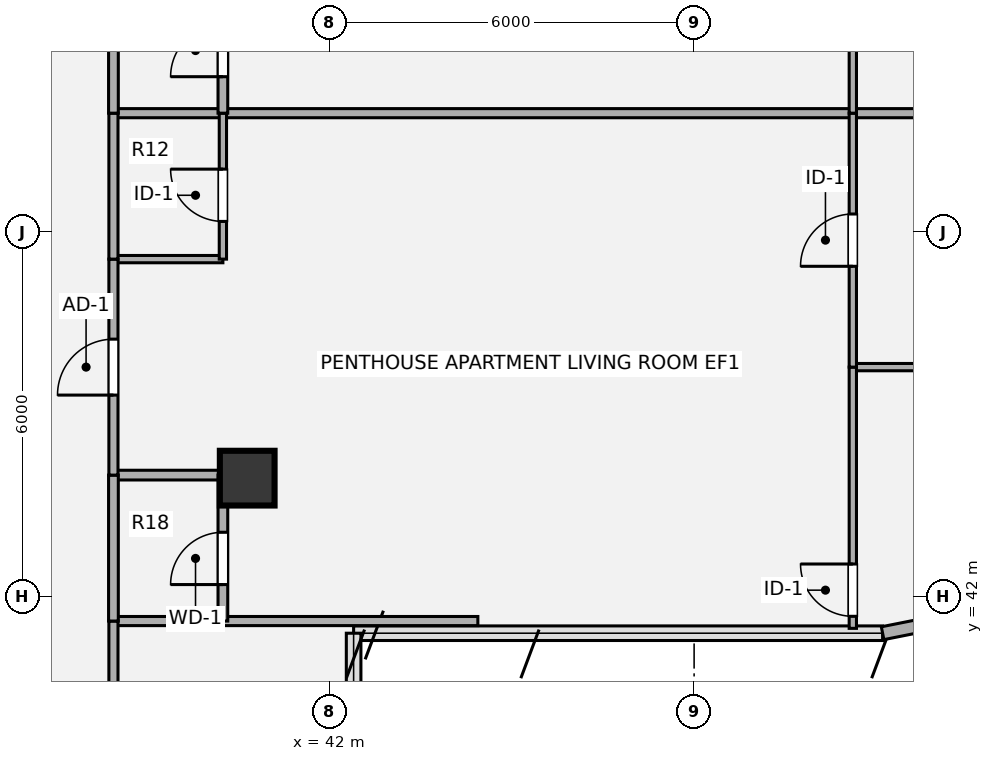
"""IFC4 building model, lengths in metres.
Left out: names, types, materials, properties, quantities, classifications, styles, units other than length and angle.
Written with IfcOpenShell. Run it as: python <this file> out.ifc"""

import sys

from ifc_helpers import new_model, si_unit, direction, frame, frame_2d, origin, origin_2d, place, context, subcontext, project, spatial, rectangle, hollow_circle, extrude, source, transform, mapped, element, fill, save


model = new_model("IFC4")
c1 = context("Model", 3, precision=1e-05, world=origin(), true_north=direction((0.0, 1.0)))
c2 = subcontext(c1, "Body", "Model", "MODEL_VIEW")
j1 = project(units=[si_unit("LENGTHUNIT", "METRE"), si_unit("PLANEANGLEUNIT", "RADIAN")], contexts=[c1])
p1 = place(None, origin())
s1 = spatial("IfcSite", under=j1, at=p1, CompositionType="ELEMENT")
p2 = place(p1, origin())
s2 = spatial("IfcBuilding", under=s1, at=p2, CompositionType="ELEMENT")
p3 = place(p2, frame((0.0, 0.0, 223.02)))
s3 = spatial("IfcBuildingStorey", under=s2, at=p3, CompositionType="ELEMENT", Elevation=223.02)
m1 = source(origin(), c2, "Body", "SweptSolid", [
    extrude(hollow_circle(Radius=0.45, WallThickness=0.032, at=origin_2d()), origin(), (0.0, 0.0, 1.0), 3.78),
])
p4 = place(p3, frame((40.65, 43.95, 0.0), z_axis=(0.0, 0.0, 1.0), x_axis=(1.0, 0.0, 0.0)))
e1 = element("IfcColumn", 1, at=p4, inside=s3, PredefinedType="COLUMN", context=c2, shape_type="MappedRepresentation", body=[
    mapped(m1, transform((0.0, 0.0, 0.0), x_axis=(1.0, 0.0, 0.0), y_axis=(0.0, 1.0, 0.0), z_axis=(0.0, 0.0, 1.0), scale=1.0)),
])
p5 = place(p3, frame((52.325, 41.644, 0.0), z_axis=(0.0, 0.0, 1.0), x_axis=(-0.980775717779, -0.195138390419, 0.0)))
e2 = element("IfcWall", 2, at=p5, inside=s3, PredefinedType="SOLIDWALL", context=c2, shape_type="SweptSolid", body=[
    extrude(rectangle(XDim=1.249, YDim=0.215, at=frame_2d((0.624, 0.0))), origin(), (0.0, 0.0, 1.0), 3.53),
])
p6 = place(p3, frame((38.45, 41.6, 0.0), z_axis=(0.0, 0.0, 1.0), x_axis=(1.0, 0.0, 0.0)))
e3 = element("IfcWall", 3, at=p6, inside=s3, PredefinedType="PARTITIONING", context=c2, shape_type="SweptSolid", body=[
    extrude(rectangle(XDim=5.993, YDim=0.15, at=frame_2d((2.997, 0.0))), origin(), (0.0, 0.0, 1.0), 3.5),
])
p7 = place(p3, frame((38.45, 44.0, 0.0), z_axis=(0.0, 0.0, 1.0), x_axis=(1.0, 0.0, 0.0)))
e4 = element("IfcWall", 4, at=p7, inside=s3, PredefinedType="PLUMBINGWALL", context=c2, shape_type="SweptSolid", body=[
    extrude(rectangle(XDim=1.8, YDim=0.16, at=frame_2d((0.9, 0.0))), origin(), (0.0, 0.0, 1.0), 2.903),
])
p8 = place(p3, frame((50.61, 45.776, 0.0), z_axis=(0.0, 0.0, 1.0), x_axis=(1.0, 0.0, 0.0)))
e5 = element("IfcWall", 5, at=p8, inside=s3, PredefinedType="PARTITIONING", context=c2, shape_type="SweptSolid", body=[
    extrude(rectangle(XDim=3.61, YDim=0.12, at=frame_2d((1.805, 0.0))), origin(), (0.0, 0.0, 1.0), 2.982),
])
p9 = place(p3, frame((38.45, 47.552, 0.0), z_axis=(0.0, 0.0, 1.0), x_axis=(1.0, 0.0, 0.0)))
e6 = element("IfcWall", 6, at=p9, inside=s3, PredefinedType="PARTITIONING", context=c2, shape_type="SweptSolid", body=[
    extrude(rectangle(XDim=1.8, YDim=0.12, at=frame_2d((0.9, 0.0))), origin(), (0.0, 0.0, 1.0), 3.259),
])
p10 = place(p3, frame((38.45, 49.952, 0.0), z_axis=(0.0, 0.0, 1.0), x_axis=(1.0, 0.0, 0.0)))
e7 = element("IfcWall", 7, at=p10, inside=s3, PredefinedType="PARTITIONING", context=c2, shape_type="SweptSolid", body=[
    extrude(rectangle(XDim=15.77, YDim=0.15, at=frame_2d((7.885, 0.0))), origin(), (0.0, 0.0, 1.0), 2.982),
])
p11 = place(p3, frame((38.45, 22.4, 0.0), z_axis=(0.0, 0.0, 1.0), x_axis=(0.0, 1.0, 0.0)))
e8 = element("IfcWall", 8, at=p11, inside=s3, PredefinedType="PARTITIONING", context=c2, shape_type="SweptSolid", body=[
    extrude(rectangle(XDim=19.2, YDim=0.15, at=frame_2d((9.6, 0.0))), origin(), (0.0, 0.0, 1.0), 3.5),
])
p12 = place(p11, frame((8.975, 0.0, 0.0)))
e9 = element("IfcOpeningElement", 9, at=p12, cuts=e8, PredefinedType="OPENING", context=c2, shape_type="SweptSolid", body=[
    extrude(rectangle(XDim=1.05, YDim=2.1, at=origin_2d()), frame((0.525, 0.085, 1.05), z_axis=(0.0, -1.0, 0.0), x_axis=(1.0, 0.0, 0.0)), (0.0, 0.0, 1.0), 0.17),
])
p13 = place(p3, frame((38.45, 41.6, 0.0), z_axis=(0.0, 0.0, 1.0), x_axis=(0.0, 1.0, 0.0)))
e10 = element("IfcWall", 10, at=p13, inside=s3, PredefinedType="PLUMBINGWALL", context=c2, shape_type="SweptSolid", body=[
    extrude(rectangle(XDim=2.4, YDim=0.16, at=frame_2d((1.2, 0.0))), origin(), (0.0, 0.0, 1.0), 3.5),
])
p14 = place(p3, frame((38.45, 44.0, 0.0), z_axis=(0.0, 0.0, 1.0), x_axis=(0.0, 1.0, 0.0)))
e11 = element("IfcWall", 11, at=p14, inside=s3, PredefinedType="PARTITIONING", context=c2, shape_type="SweptSolid", body=[
    extrude(rectangle(XDim=3.552, YDim=0.15, at=frame_2d((1.776, 0.0))), origin(), (0.0, 0.0, 1.0), 3.5),
])
p15 = place(p14, frame((1.316, 0.0, 0.0)))
e12 = element("IfcOpeningElement", 12, at=p15, cuts=e11, PredefinedType="OPENING", context=c2, shape_type="SweptSolid", body=[
    extrude(rectangle(XDim=0.92, YDim=2.1, at=origin_2d()), frame((0.46, 0.085, 1.05), z_axis=(0.0, -1.0, 0.0), x_axis=(1.0, 0.0, 0.0)), (0.0, 0.0, 1.0), 0.17),
])
p16 = place(p3, frame((38.45, 47.552, 0.0), z_axis=(0.0, 0.0, 1.0), x_axis=(0.0, 1.0, 0.0)))
e13 = element("IfcWall", 13, at=p16, inside=s3, PredefinedType="PARTITIONING", context=c2, shape_type="SweptSolid", body=[
    extrude(rectangle(XDim=2.4, YDim=0.15, at=frame_2d((1.2, 0.0))), origin(), (0.0, 0.0, 1.0), 3.5),
])
p17 = place(p3, frame((38.45, 49.952, 0.0), z_axis=(0.0, 0.0, 1.0), x_axis=(0.0, 1.0, 0.0)))
e14 = element("IfcWall", 14, at=p17, inside=s3, PredefinedType="PLUMBINGWALL", context=c2, shape_type="SweptSolid", body=[
    extrude(rectangle(XDim=2.4, YDim=0.16, at=frame_2d((1.2, 0.0))), origin(), (0.0, 0.0, 1.0), 3.5),
])
p18 = place(p3, frame((40.25, 41.6, 0.0), z_axis=(0.0, 0.0, 1.0), x_axis=(0.0, 1.0, 0.0)))
e15 = element("IfcWall", 15, at=p18, inside=s3, PredefinedType="PLUMBINGWALL", context=c2, shape_type="SweptSolid", body=[
    extrude(rectangle(XDim=2.4, YDim=0.16, at=frame_2d((1.2, 0.0))), origin(), (0.0, 0.0, 1.0), 3.5),
])
p19 = place(p18, frame((0.6, 0.0, 0.0)))
e16 = element("IfcOpeningElement", 16, at=p19, cuts=e15, PredefinedType="OPENING", context=c2, shape_type="SweptSolid", body=[
    extrude(rectangle(XDim=0.86, YDim=2.1, at=origin_2d()), frame((0.43, 0.09, 1.05), z_axis=(0.0, -1.0, 0.0), x_axis=(1.0, 0.0, 0.0)), (0.0, 0.0, 1.0), 0.18),
])
p20 = place(p3, frame((40.25, 47.552, 0.0), z_axis=(0.0, 0.0, 1.0), x_axis=(0.0, 1.0, 0.0)))
e17 = element("IfcWall", 17, at=p20, inside=s3, PredefinedType="PARTITIONING", context=c2, shape_type="SweptSolid", body=[
    extrude(rectangle(XDim=2.4, YDim=0.12, at=frame_2d((1.2, 0.0))), origin(), (0.0, 0.0, 1.0), 3.5),
])
p21 = place(p20, frame((0.62, 0.0, 0.0)))
e18 = element("IfcOpeningElement", 18, at=p21, cuts=e17, PredefinedType="OPENING", context=c2, shape_type="SweptSolid", body=[
    extrude(rectangle(XDim=0.86, YDim=2.1, at=origin_2d()), frame((0.43, 0.07, 1.05), z_axis=(0.0, -1.0, 0.0), x_axis=(1.0, 0.0, 0.0)), (0.0, 0.0, 1.0), 0.14),
])
p22 = place(p3, frame((40.25, 49.952, 0.0), z_axis=(0.0, 0.0, 1.0), x_axis=(0.0, 1.0, 0.0)))
e19 = element("IfcWall", 19, at=p22, inside=s3, PredefinedType="PLUMBINGWALL", context=c2, shape_type="SweptSolid", body=[
    extrude(rectangle(XDim=2.4, YDim=0.16, at=frame_2d((1.2, 0.0))), origin(), (0.0, 0.0, 1.0), 3.5),
])
p23 = place(p22, frame((0.6, 0.0, 0.0)))
e20 = element("IfcOpeningElement", 20, at=p23, cuts=e19, PredefinedType="OPENING", context=c2, shape_type="SweptSolid", body=[
    extrude(rectangle(XDim=0.86, YDim=2.1, at=origin_2d()), frame((0.43, 0.09, 1.05), z_axis=(0.0, -1.0, 0.0), x_axis=(1.0, 0.0, 0.0)), (0.0, 0.0, 1.0), 0.18),
])
p24 = place(p3, frame((50.61, 41.48, 0.0), z_axis=(0.0, 0.0, 1.0), x_axis=(0.0, 1.0, 0.0)))
e21 = element("IfcWall", 21, at=p24, inside=s3, PredefinedType="PARTITIONING", context=c2, shape_type="SweptSolid", body=[
    extrude(rectangle(XDim=4.296, YDim=0.12, at=frame_2d((2.148, 0.0))), origin(), (0.0, 0.0, 1.0), 3.5),
])
p25 = place(p24, frame((0.198, 0.0, 0.0)))
e22 = element("IfcOpeningElement", 22, at=p25, cuts=e21, PredefinedType="OPENING", context=c2, shape_type="SweptSolid", body=[
    extrude(rectangle(XDim=0.86, YDim=2.1, at=origin_2d()), frame((0.43, 0.07, 1.05), z_axis=(0.0, -1.0, 0.0), x_axis=(1.0, 0.0, 0.0)), (0.0, 0.0, 1.0), 0.14),
])
p26 = place(p3, frame((50.61, 45.776, 0.0), z_axis=(0.0, 0.0, 1.0), x_axis=(0.0, 1.0, 0.0)))
e23 = element("IfcWall", 23, at=p26, inside=s3, PredefinedType="PARTITIONING", context=c2, shape_type="SweptSolid", body=[
    extrude(rectangle(XDim=4.176, YDim=0.12, at=frame_2d((2.088, 0.0))), origin(), (0.0, 0.0, 1.0), 3.5),
])
p27 = place(p26, frame((1.658, 0.0, 0.0)))
e24 = element("IfcOpeningElement", 24, at=p27, cuts=e23, PredefinedType="OPENING", context=c2, shape_type="SweptSolid", body=[
    extrude(rectangle(XDim=0.86, YDim=2.1, at=origin_2d()), frame((0.43, 0.07, 1.05), z_axis=(0.0, -1.0, 0.0), x_axis=(1.0, 0.0, 0.0)), (0.0, 0.0, 1.0), 0.14),
])
p28 = place(p3, frame((50.61, 49.952, 0.0), z_axis=(0.0, 0.0, 1.0), x_axis=(0.0, 1.0, 0.0)))
e25 = element("IfcWall", 25, at=p28, inside=s3, PredefinedType="PARTITIONING", context=c2, shape_type="SweptSolid", body=[
    extrude(rectangle(XDim=4.524, YDim=0.12, at=frame_2d((2.262, 0.0))), origin(), (0.0, 0.0, 1.0), 3.5),
])
p29 = place(p28, frame((1.832, 0.0, 0.0)))
e26 = element("IfcOpeningElement", 26, at=p29, cuts=e25, PredefinedType="OPENING", context=c2, shape_type="SweptSolid", body=[
    extrude(rectangle(XDim=0.86, YDim=2.1, at=origin_2d()), frame((0.43, 0.07, 1.05), z_axis=(0.0, -1.0, 0.0), x_axis=(1.0, 0.0, 0.0)), (0.0, 0.0, 1.0), 0.14),
])
m2 = source(origin(), c2, "Body", "SweptSolid", [
    extrude(rectangle(XDim=0.92, YDim=2.1, at=origin_2d()), frame((0.46, 0.025, 1.05), z_axis=(0.0, -1.0, 0.0), x_axis=(1.0, 0.0, 0.0)), (0.0, 0.0, 1.0), 0.05),
])
p30 = place(p15, origin())
e27 = element("IfcDoor", 27, at=p30, inside=s3, OperationType="SINGLE_SWING_LEFT", PredefinedType="DOOR", context=c2, shape_type="MappedRepresentation", body=[
    mapped(m2, transform((0.0, 0.0, 0.0), x_axis=(1.0, 0.0, 0.0), y_axis=(0.0, 1.0, 0.0), z_axis=(0.0, 0.0, 1.0), scale=1.0)),
])
fill(e12, e27)
m3 = source(origin(), c2, "Body", "SweptSolid", [
    extrude(rectangle(XDim=0.86, YDim=2.1, at=origin_2d()), frame((0.43, 0.025, 1.05), z_axis=(0.0, -1.0, 0.0), x_axis=(1.0, 0.0, 0.0)), (0.0, 0.0, 1.0), 0.05),
])
p31 = place(p19, origin())
e28 = element("IfcDoor", 28, at=p31, inside=s3, OperationType="SINGLE_SWING_LEFT", PredefinedType="DOOR", context=c2, shape_type="MappedRepresentation", body=[
    mapped(m3, transform((0.0, 0.0, 0.0), x_axis=(1.0, 0.0, 0.0), y_axis=(0.0, 1.0, 0.0), z_axis=(0.0, 0.0, 1.0), scale=1.0)),
])
fill(e16, e28)
m4 = source(origin(), c2, "Body", "SweptSolid", [
    extrude(rectangle(XDim=0.86, YDim=2.1, at=origin_2d()), frame((0.43, 0.025, 1.05), z_axis=(0.0, -1.0, 0.0), x_axis=(1.0, 0.0, 0.0)), (0.0, 0.0, 1.0), 0.05),
])
p32 = place(p21, origin())
e29 = element("IfcDoor", 29, at=p32, inside=s3, OperationType="SINGLE_SWING_RIGHT", PredefinedType="DOOR", context=c2, shape_type="MappedRepresentation", body=[
    mapped(m4, transform((0.0, 0.0, 0.0), x_axis=(1.0, 0.0, 0.0), y_axis=(0.0, 1.0, 0.0), z_axis=(0.0, 0.0, 1.0), scale=1.0)),
])
fill(e18, e29)
p33 = place(p23, origin())
e30 = element("IfcDoor", 30, at=p33, inside=s3, OperationType="SINGLE_SWING_LEFT", PredefinedType="DOOR", context=c2, shape_type="MappedRepresentation", body=[
    mapped(m3, transform((0.0, 0.0, 0.0), x_axis=(1.0, 0.0, 0.0), y_axis=(0.0, 1.0, 0.0), z_axis=(0.0, 0.0, 1.0), scale=1.0)),
])
fill(e20, e30)
p34 = place(p25, origin())
e31 = element("IfcDoor", 31, at=p34, inside=s3, OperationType="SINGLE_SWING_RIGHT", PredefinedType="DOOR", context=c2, shape_type="MappedRepresentation", body=[
    mapped(m4, transform((0.0, 0.0, 0.0), x_axis=(1.0, 0.0, 0.0), y_axis=(0.0, 1.0, 0.0), z_axis=(0.0, 0.0, 1.0), scale=1.0)),
])
fill(e22, e31)
p35 = place(p27, origin())
e32 = element("IfcDoor", 32, at=p35, inside=s3, OperationType="SINGLE_SWING_LEFT", PredefinedType="DOOR", context=c2, shape_type="MappedRepresentation", body=[
    mapped(m4, transform((0.0, 0.0, 0.0), x_axis=(1.0, 0.0, 0.0), y_axis=(0.0, 1.0, 0.0), z_axis=(0.0, 0.0, 1.0), scale=1.0)),
])
fill(e24, e32)
save(model, sys.argv[1])
